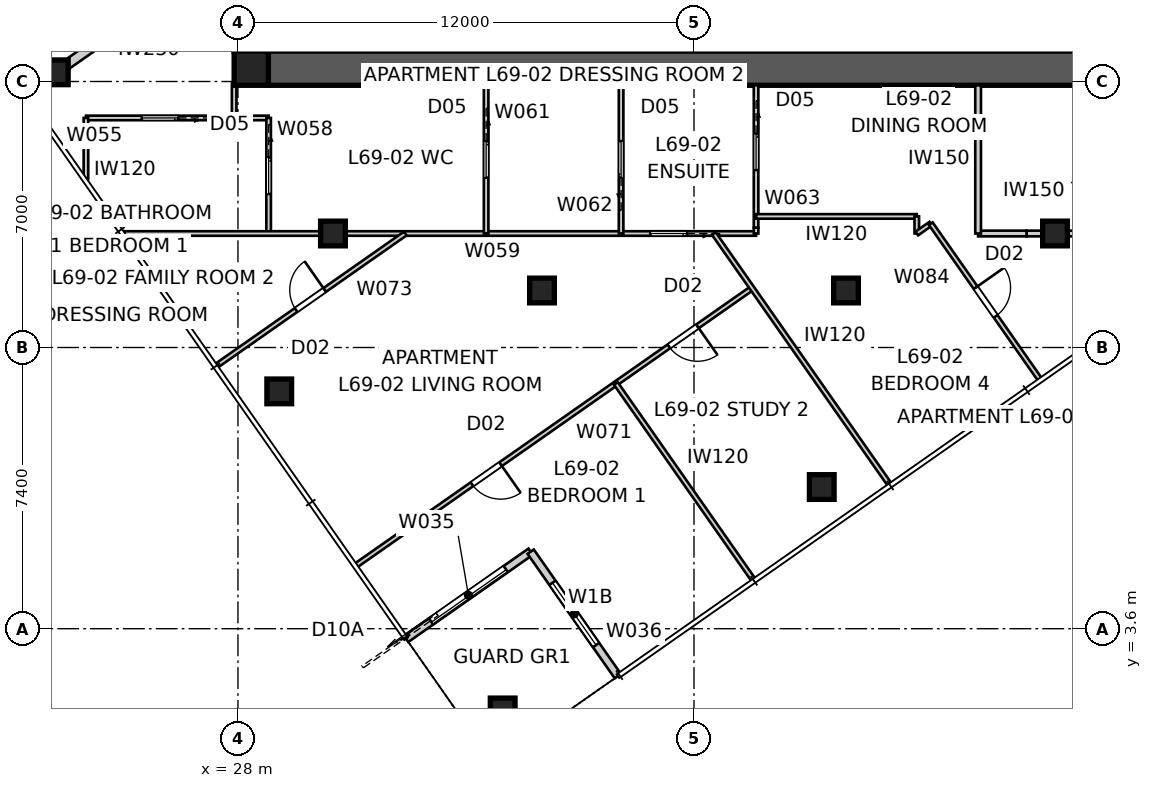
"""IFC4 building model, lengths in metres.
Left out: names, types, materials, properties, quantities, classifications, styles, units other than length and angle.
Written with IfcOpenShell. Run it as: python <this file> out.ifc"""

import sys

from ifc_helpers import new_model, si_unit, direction, frame, frame_2d, origin, origin_2d, place, context, subcontext, project, spatial, polyline, rectangle, outline, extrude, element, fill, save


model = new_model("IFC4")
c1 = context("Model", 3, precision=1e-05, world=origin(), true_north=direction((0.0, 1.0)))
c2 = subcontext(c1, "Body", "Model", "MODEL_VIEW")
j1 = project(units=[si_unit("LENGTHUNIT", "METRE"), si_unit("PLANEANGLEUNIT", "RADIAN")], contexts=[c1])
p1 = place(None, origin())
s1 = spatial("IfcSite", under=j1, at=p1, CompositionType="ELEMENT")
p2 = place(p1, origin())
s2 = spatial("IfcBuilding", under=s1, at=p2, CompositionType="ELEMENT")
p3 = place(p2, frame((0.0, 0.0, 250.6)))
s3 = spatial("IfcBuildingStorey", under=s2, at=p3, CompositionType="ELEMENT", Elevation=250.6)
p4 = place(p3, frame((51.2, 18.35, 0.0), z_axis=(0.0, 0.0, 1.0), x_axis=(-1.0, 0.0, 0.0)))
e1 = element("IfcWall", 1, at=p4, inside=s3, PredefinedType="SHEAR", context=c2, shape_type="SweptSolid", body=[
    extrude(outline(polyline([(0.0, -0.45), (22.4, -0.45), (22.4, -0.025), (22.85, -0.025), (22.85, 0.025), (22.4, 0.025), (22.4, 0.45), (0.0, 0.45), (0.0, 0.025), (-0.45, 0.025), (-0.45, -0.025), (0.0, -0.025), (0.0, -0.45)])), origin(), (0.0, 0.0, 1.0), 3.4),
])
p5 = place(p3, frame((28.35, 41.2, 0.0), z_axis=(0.0, 0.0, 1.0), x_axis=(0.0, -1.0, 0.0)))
e2 = element("IfcWall", 2, at=p5, inside=s3, PredefinedType="SHEAR", context=c2, shape_type="SweptSolid", body=[
    extrude(outline(polyline([(0.0, -0.45), (22.4, -0.45), (22.4, -0.025), (22.85, -0.025), (22.85, 0.025), (22.4, 0.025), (22.4, 0.45), (0.0, 0.45), (0.0, 0.025), (-0.45, 0.025), (-0.45, -0.025), (0.0, -0.025), (0.0, -0.45)])), origin(), (0.0, 0.0, 1.0), 3.4),
])
p6 = place(p5, frame((11.14, 0.0, 0.0)))
e3 = element("IfcOpeningElement", 3, at=p6, cuts=e2, PredefinedType="OPENING", context=c2, shape_type="SweptSolid", body=[
    extrude(rectangle(XDim=1.02, YDim=2.4, at=frame_2d((0.51, 1.2))), frame((0.0, 0.46, 0.0), z_axis=(0.0, -1.0, 0.0), x_axis=(1.0, 0.0, 0.0)), (0.0, 0.0, 1.0), 0.92),
])
p7 = place(p3, frame((28.35, 18.35, 0.0), z_axis=(0.0, 0.0, 1.0), x_axis=(1.0, 0.0, 0.0)))
e4 = element("IfcColumn", 4, at=p7, inside=s3, PredefinedType="COLUMN", context=c2, shape_type="SweptSolid", body=[
    extrude(rectangle(XDim=0.9, YDim=0.9, at=origin_2d()), origin(), (0.0, 0.0, 1.0), 3.4),
])
for number, where, z_axis, x_axis in (
    (5, (34.966, 1.449, 0.0), (0.0, 0.0, 1.0), (1.0, 0.0, 0.0)),
    (6, (43.362, 7.328, 0.0), (0.0, 0.0, 1.0), (1.0, 0.0, 0.0)),
    (7, (23.207, 18.242, 0.0), (0.0, 0.0, 1.0), (1.0, 0.0, 0.0)),
    (8, (29.086, 9.845, 0.0), (0.0, 0.0, 1.0), (1.0, 0.0, 0.0)),
    (9, (30.5, 14.0, 0.0), (0.0, 0.0, 1.0), (1.0, 0.0, 0.0)),
    (10, (36.0, 12.5, 0.0), (0.0, 0.0, 1.0), (1.0, 0.0, 0.0)),
    (11, (44.0, 12.5, 0.0), (0.0, 0.0, 1.0), (1.0, 0.0, 0.0)),
    (12, (49.5, 14.0, 0.0), (0.0, 0.0, 1.0), (1.0, 0.0, 0.0)),
):
    element("IfcColumn", number, at=place(p3, frame(where, z_axis=z_axis, x_axis=x_axis)), inside=s3, PredefinedType="COLUMN", context=c2, shape_type="SweptSolid", body=[
        extrude(rectangle(XDim=0.65, YDim=0.65, at=origin_2d()), origin(), (0.0, 0.0, 1.0), 3.4),
    ])
p8 = place(p3, frame((32.426, 3.333, 0.0), z_axis=(0.0, 0.0, 1.0), x_axis=(0.819165963305, 0.573556557423, 0.0)))
e13 = element("IfcWall", 13, at=p8, inside=s3, PredefinedType="SOLIDWALL", context=c2, shape_type="SweptSolid", body=[
    extrude(rectangle(XDim=4.0, YDim=0.2, at=frame_2d((2.0, 0.0))), origin(), (0.0, 0.0, 1.0), 3.25),
])
p9 = place(p8, frame((0.8, 0.0, 0.0)))
e14 = element("IfcOpeningElement", 14, at=p9, cuts=e13, PredefinedType="OPENING", context=c2, shape_type="SweptSolid", body=[
    extrude(rectangle(XDim=2.4, YDim=2.1, at=frame_2d((1.2, 1.05))), frame((0.0, 0.11, 0.0), z_axis=(0.0, -1.0, 0.0), x_axis=(1.0, 0.0, 0.0)), (0.0, 0.0, 1.0), 0.22),
])
p10 = place(p3, frame((35.702, 5.627, 0.0), z_axis=(0.0, 0.0, 1.0), x_axis=(0.573597512525, -0.819137286189, 0.0)))
e15 = element("IfcWall", 15, at=p10, inside=s3, PredefinedType="SOLIDWALL", context=c2, shape_type="SweptSolid", body=[
    extrude(rectangle(XDim=4.0, YDim=0.2, at=frame_2d((2.0, 0.0))), origin(), (0.0, 0.0, 1.0), 3.25),
])
p11 = place(p10, frame((1.0, 0.0, 0.45)))
e16 = element("IfcOpeningElement", 16, at=p11, cuts=e15, PredefinedType="OPENING", context=c2, shape_type="SweptSolid", body=[
    extrude(rectangle(XDim=2.0, YDim=1.8, at=frame_2d((1.0, 0.9))), frame((0.0, 0.11, 0.0), z_axis=(0.0, -1.0, 0.0), x_axis=(1.0, 0.0, 0.0)), (0.0, 0.0, 1.0), 0.22),
])
p12 = place(p3, frame((22.388, 17.668, 0.0), z_axis=(0.0, 0.0, 1.0), x_axis=(0.819161528122, 0.573562891796, 0.0)))
e17 = element("IfcWall", 17, at=p12, inside=s3, PredefinedType="PARTITIONING", context=c2, shape_type="SweptSolid", body=[
    extrude(rectangle(XDim=6.681, YDim=0.25, at=frame_2d((3.341, 0.0))), origin(), (0.0, 0.0, 1.0), 3.25),
])
p13 = place(p3, frame((28.807, 17.041, 0.0), z_axis=(0.0, 0.0, 1.0), x_axis=(-1.0, 0.0, 0.0)))
e18 = element("IfcWall", 18, at=p13, inside=s3, PredefinedType="PARTITIONING", context=c2, shape_type="SweptSolid", body=[
    extrude(rectangle(XDim=4.807, YDim=0.12, at=frame_2d((2.404, 0.0))), origin(), (0.0, 0.0, 1.0), 3.25),
])
p14 = place(p13, frame((2.377, 0.0, 0.0)))
e19 = element("IfcOpeningElement", 19, at=p14, cuts=e18, PredefinedType="OPENING", context=c2, shape_type="SweptSolid", body=[
    extrude(rectangle(XDim=0.96, YDim=2.1, at=frame_2d((0.48, 1.05))), frame((0.0, 0.07, 0.0), z_axis=(0.0, -1.0, 0.0), x_axis=(1.0, 0.0, 0.0)), (0.0, 0.0, 1.0), 0.14),
])
p15 = place(p3, frame((24.0, 17.041, 0.0), z_axis=(0.0, 0.0, 1.0), x_axis=(0.0, -1.0, 0.0)))
e20 = element("IfcWall", 20, at=p15, inside=s3, PredefinedType="PARTITIONING", context=c2, shape_type="SweptSolid", body=[
    extrude(rectangle(XDim=1.605, YDim=0.12, at=frame_2d((0.803, 0.0))), origin(), (0.0, 0.0, 1.0), 3.25),
])
p16 = place(p3, frame((27.9, 17.95, 0.0), z_axis=(0.0, 0.0, 1.0), x_axis=(0.0, -1.0, 0.0)))
e21 = element("IfcWall", 21, at=p16, inside=s3, PredefinedType="PARTITIONING", context=c2, shape_type="SweptSolid", body=[
    extrude(rectangle(XDim=0.909, YDim=0.12, at=frame_2d((0.454, 0.0))), origin(), (0.0, 0.0, 1.0), 3.25),
])
p17 = place(p3, frame((28.807, 17.041, 0.0), z_axis=(0.0, 0.0, 1.0), x_axis=(0.0, -1.0, 0.0)))
e22 = element("IfcWall", 22, at=p17, inside=s3, PredefinedType="PARTITIONING", context=c2, shape_type="SweptSolid", body=[
    extrude(rectangle(XDim=3.041, YDim=0.12, at=frame_2d((1.521, 0.0))), origin(), (0.0, 0.0, 1.0), 3.25),
])
p18 = place(p17, frame((1.041, 0.0, 0.0)))
e23 = element("IfcOpeningElement", 23, at=p18, cuts=e22, PredefinedType="OPENING", context=c2, shape_type="SweptSolid", body=[
    extrude(rectangle(XDim=0.96, YDim=2.1, at=frame_2d((0.48, 1.05))), frame((0.0, 0.07, 0.0), z_axis=(0.0, -1.0, 0.0), x_axis=(1.0, 0.0, 0.0)), (0.0, 0.0, 1.0), 0.14),
])
p19 = place(p3, frame((41.634, 14.0, 0.0), z_axis=(0.0, 0.0, 1.0), x_axis=(-1.0, 0.0, 0.0)))
e24 = element("IfcWall", 24, at=p19, inside=s3, PredefinedType="PARTITIONING", context=c2, shape_type="SweptSolid", body=[
    extrude(rectangle(XDim=16.628, YDim=0.12, at=frame_2d((8.314, 0.0))), origin(), (0.0, 0.0, 1.0), 2.55),
])
p20 = place(p19, frame((1.821, 0.0, 0.0)))
e25 = element("IfcOpeningElement", 25, at=p20, cuts=e24, PredefinedType="OPENING", context=c2, shape_type="SweptSolid", body=[
    extrude(rectangle(XDim=0.96, YDim=2.1, at=frame_2d((0.48, 1.05))), frame((0.0, 0.07, 0.0), z_axis=(0.0, -1.0, 0.0), x_axis=(1.0, 0.0, 0.0)), (0.0, 0.0, 1.0), 0.14),
])
p21 = place(p3, frame((34.53, 17.9, 0.0), z_axis=(0.0, 0.0, 1.0), x_axis=(0.0, -1.0, 0.0)))
e26 = element("IfcWall", 26, at=p21, inside=s3, PredefinedType="PARTITIONING", context=c2, shape_type="SweptSolid", body=[
    extrude(rectangle(XDim=3.9, YDim=0.12, at=frame_2d((1.95, 0.0))), origin(), (0.0, 0.0, 1.0), 3.25),
])
p22 = place(p21, frame((1.47, 0.0, 0.0)))
e27 = element("IfcOpeningElement", 27, at=p22, cuts=e26, PredefinedType="OPENING", context=c2, shape_type="SweptSolid", body=[
    extrude(rectangle(XDim=0.96, YDim=2.1, at=frame_2d((0.48, 1.05))), frame((0.0, 0.07, 0.0), z_axis=(0.0, -1.0, 0.0), x_axis=(1.0, 0.0, 0.0)), (0.0, 0.0, 1.0), 0.14),
])
p23 = place(p3, frame((38.082, 14.0, 0.0), z_axis=(0.0, 0.0, 1.0), x_axis=(0.0, 1.0, 0.0)))
e28 = element("IfcWall", 28, at=p23, inside=s3, PredefinedType="PARTITIONING", context=c2, shape_type="SweptSolid", body=[
    extrude(rectangle(XDim=3.9, YDim=0.12, at=frame_2d((1.95, 0.0))), origin(), (0.0, 0.0, 1.0), 3.25),
])
p24 = place(p23, frame((1.47, 0.0, 0.0)))
e29 = element("IfcOpeningElement", 29, at=p24, cuts=e28, PredefinedType="OPENING", context=c2, shape_type="SweptSolid", body=[
    extrude(rectangle(XDim=0.96, YDim=2.1, at=frame_2d((0.48, 1.05))), frame((0.0, 0.07, 0.0), z_axis=(0.0, -1.0, 0.0), x_axis=(1.0, 0.0, 0.0)), (0.0, 0.0, 1.0), 0.14),
])
p25 = place(p3, frame((41.634, 17.9, 0.0), z_axis=(0.0, 0.0, 1.0), x_axis=(0.0, -1.0, 0.0)))
e30 = element("IfcWall", 30, at=p25, inside=s3, PredefinedType="PARTITIONING", context=c2, shape_type="SweptSolid", body=[
    extrude(rectangle(XDim=3.746, YDim=0.12, at=frame_2d((1.873, 0.0))), origin(), (0.0, 0.0, 1.0), 3.25),
])
p26 = place(p25, frame((1.27, 0.0, 0.0)))
e31 = element("IfcOpeningElement", 31, at=p26, cuts=e30, PredefinedType="OPENING", context=c2, shape_type="SweptSolid", body=[
    extrude(rectangle(XDim=0.96, YDim=2.1, at=frame_2d((0.48, 1.05))), frame((0.0, 0.07, 0.0), z_axis=(0.0, -1.0, 0.0), x_axis=(1.0, 0.0, 0.0)), (0.0, 0.0, 1.0), 0.14),
])
p27 = place(p3, frame((51.722, 14.0, 0.0), z_axis=(0.0, 0.0, 1.0), x_axis=(-1.0, 0.0, 0.0)))
e32 = element("IfcWall", 32, at=p27, inside=s3, PredefinedType="SOLIDWALL", context=c2, shape_type="SweptSolid", body=[
    extrude(rectangle(XDim=2.202, YDim=0.15, at=frame_2d((1.101, 0.0))), origin(), (0.0, 0.0, 1.0), 3.25),
])
p28 = place(p3, frame((49.521, 14.0, 0.0), z_axis=(0.0, 0.0, 1.0), x_axis=(-1.0, 0.0, 0.0)))
e33 = element("IfcWall", 33, at=p28, inside=s3, PredefinedType="SOLIDWALL", context=c2, shape_type="SweptSolid", body=[
    extrude(rectangle(XDim=0.771, YDim=0.15, at=frame_2d((0.385, 0.0))), origin(), (0.0, 0.0, 1.0), 2.55),
])
p29 = place(p3, frame((48.75, 14.0, 0.0), z_axis=(0.0, 0.0, 1.0), x_axis=(-1.0, 0.0, 0.0)))
e34 = element("IfcWall", 34, at=p29, inside=s3, PredefinedType="SOLIDWALL", context=c2, shape_type="SweptSolid", body=[
    extrude(rectangle(XDim=1.274, YDim=0.15, at=frame_2d((0.637, 0.0))), origin(), (0.0, 0.0, 1.0), 3.25),
])
p30 = place(p3, frame((47.476, 14.0, 0.0), z_axis=(0.0, 0.0, 1.0), x_axis=(0.0, 1.0, 0.0)))
e35 = element("IfcWall", 35, at=p30, inside=s3, PredefinedType="SOLIDWALL", context=c2, shape_type="SweptSolid", body=[
    extrude(rectangle(XDim=3.9, YDim=0.15, at=frame_2d((1.95, 0.0))), origin(), (0.0, 0.0, 1.0), 3.25),
])
p31 = place(p3, frame((41.528, 12.562, 0.0), z_axis=(0.0, 0.0, 1.0), x_axis=(-0.819155207289, -0.573571919092, 0.0)))
e36 = element("IfcWall", 36, at=p31, inside=s3, PredefinedType="PARTITIONING", context=c2, shape_type="SweptSolid", body=[
    extrude(rectangle(XDim=12.71, YDim=0.12, at=frame_2d((6.355, 0.0))), origin(), (0.0, 0.0, 1.0), 3.25),
])
p32 = place(p31, frame((8.077, 0.0, 0.0)))
e37 = element("IfcOpeningElement", 37, at=p32, cuts=e36, PredefinedType="OPENING", context=c2, shape_type="SweptSolid", body=[
    extrude(rectangle(XDim=0.92, YDim=2.34, at=frame_2d((0.46, 1.17))), frame((0.0, 0.07, 0.0), z_axis=(0.0, -1.0, 0.0), x_axis=(1.0, 0.0, 0.0)), (0.0, 0.0, 1.0), 0.14),
])
p33 = place(p31, frame((1.752, 0.0, 0.0)))
e38 = element("IfcOpeningElement", 38, at=p33, cuts=e36, PredefinedType="OPENING", context=c2, shape_type="SweptSolid", body=[
    extrude(rectangle(XDim=0.92, YDim=2.34, at=frame_2d((0.46, 1.17))), frame((0.0, 0.07, 0.0), z_axis=(0.0, -1.0, 0.0), x_axis=(1.0, 0.0, 0.0)), (0.0, 0.0, 1.0), 0.14),
])
p34 = place(p3, frame((40.521, 14.0, 0.0), z_axis=(0.0, 0.0, 1.0), x_axis=(0.573574225095, -0.819153592623, 0.0)))
e39 = element("IfcWall", 39, at=p34, inside=s3, PredefinedType="PARTITIONING", context=c2, shape_type="SweptSolid", body=[
    extrude(rectangle(XDim=8.054, YDim=0.12, at=frame_2d((4.027, 0.0))), origin(), (0.0, 0.0, 1.0), 3.25),
])
p35 = place(p3, frame((27.44, 10.523, 0.0), z_axis=(0.0, 0.0, 1.0), x_axis=(0.81915432861, 0.573573173989, 0.0)))
e40 = element("IfcWall", 40, at=p35, inside=s3, PredefinedType="PARTITIONING", context=c2, shape_type="SweptSolid", body=[
    extrude(rectangle(XDim=6.061, YDim=0.12, at=frame_2d((3.031, 0.0))), origin(), (0.0, 0.0, 1.0), 3.25),
])
p36 = place(p35, frame((2.551, 0.0, 0.0)))
e41 = element("IfcOpeningElement", 41, at=p36, cuts=e40, PredefinedType="OPENING", context=c2, shape_type="SweptSolid", body=[
    extrude(rectangle(XDim=0.92, YDim=2.34, at=frame_2d((0.46, 1.17))), frame((0.0, 0.07, 0.0), z_axis=(0.0, -1.0, 0.0), x_axis=(1.0, 0.0, 0.0)), (0.0, 0.0, 1.0), 0.14),
])
p37 = place(p3, frame((37.944, 10.053, 0.0), z_axis=(0.0, 0.0, 1.0), x_axis=(0.573587188897, -0.81914451517, 0.0)))
e42 = element("IfcWall", 42, at=p37, inside=s3, PredefinedType="PARTITIONING", context=c2, shape_type="SweptSolid", body=[
    extrude(rectangle(XDim=6.3, YDim=0.12, at=frame_2d((3.15, 0.0))), origin(), (0.0, 0.0, 1.0), 3.25),
])
p38 = place(p3, frame((41.634, 14.45, 0.0), z_axis=(0.0, 0.0, 1.0), x_axis=(1.0, 0.0, 0.0)))
e43 = element("IfcWall", 43, at=p38, inside=s3, PredefinedType="PARTITIONING", context=c2, shape_type="SweptSolid", body=[
    extrude(rectangle(XDim=4.229, YDim=0.12, at=frame_2d((2.114, 0.0))), origin(), (0.0, 0.0, 1.0), 3.25),
])
for number, where, z_axis, x_axis in (
    (44, (45.862, 14.45, 0.0), (0.0, 0.0, 1.0), (0.0, -1.0, 0.0)),
    (45, (45.862, 14.0, 0.0), (0.0, 0.0, 1.0), (0.819, 0.573, 0.0)),
):
    element("IfcWall", number, at=place(p3, frame(where, z_axis=z_axis, x_axis=x_axis)), inside=s3, PredefinedType="PARTITIONING", context=c2, shape_type="SweptSolid", body=[
        extrude(rectangle(XDim=0.45, YDim=0.12, at=frame_2d((0.225, 0.0))), origin(), (0.0, 0.0, 1.0), 3.25),
    ])
p39 = place(p3, frame((46.231, 14.258, 0.0), z_axis=(0.0, 0.0, 1.0), x_axis=(0.57358708951, -0.819144584763, 0.0)))
e46 = element("IfcWall", 46, at=p39, inside=s3, PredefinedType="PARTITIONING", context=c2, shape_type="SweptSolid", body=[
    extrude(rectangle(XDim=4.991, YDim=0.12, at=frame_2d((2.496, 0.0))), origin(), (0.0, 0.0, 1.0), 3.25),
])
p40 = place(p39, frame((2.055, 0.0, 0.0)))
e47 = element("IfcOpeningElement", 47, at=p40, cuts=e46, PredefinedType="OPENING", context=c2, shape_type="SweptSolid", body=[
    extrude(rectangle(XDim=0.92, YDim=2.34, at=frame_2d((0.46, 1.17))), frame((0.0, 0.07, 0.0), z_axis=(0.0, -1.0, 0.0), x_axis=(1.0, 0.0, 0.0)), (0.0, 0.0, 1.0), 0.14),
])
p41 = place(p3, frame((41.634, 14.0, 0.0), z_axis=(0.0, 0.0, 1.0), x_axis=(0.0, 1.0, 0.0)))
e48 = element("IfcWall", 48, at=p41, inside=s3, PredefinedType="PARTITIONING", context=c2, shape_type="SweptSolid", body=[
    extrude(rectangle(XDim=0.154, YDim=0.12, at=frame_2d((0.077, 0.0))), origin(), (0.0, 0.0, 1.0), 3.25),
])
p42 = place(p9, origin())
e49 = element("IfcDoor", 49, at=p42, inside=s3, OperationType="SLIDING_TO_LEFT", PredefinedType="DOOR", context=c2, shape_type="SweptSolid", body=[
    extrude(rectangle(XDim=2.4, YDim=2.1, at=frame_2d((1.2, 1.05))), frame((0.0, 0.025, 0.0), z_axis=(0.0, -1.0, 0.0), x_axis=(1.0, 0.0, 0.0)), (0.0, 0.0, 1.0), 0.05),
])
fill(e14, e49)
p43 = place(p11, origin())
e50 = element("IfcWindow", 50, at=p43, inside=s3, PartitioningType="SINGLE_PANEL", PredefinedType="WINDOW", context=c2, shape_type="SweptSolid", body=[
    extrude(rectangle(XDim=2.0, YDim=1.8, at=frame_2d((1.0, 0.9))), frame((0.0, 0.03, 0.0), z_axis=(0.0, -1.0, 0.0), x_axis=(1.0, 0.0, 0.0)), (0.0, 0.0, 1.0), 0.06),
])
fill(e16, e50)
p44 = place(p40, origin())
e51 = element("IfcDoor", 51, at=p44, inside=s3, OperationType="SINGLE_SWING_LEFT", PredefinedType="DOOR", context=c2, shape_type="SweptSolid", body=[
    extrude(rectangle(XDim=0.92, YDim=2.34, at=frame_2d((0.46, 1.17))), frame((0.0, 0.025, 0.0), z_axis=(0.0, -1.0, 0.0), x_axis=(1.0, 0.0, 0.0)), (0.0, 0.0, 1.0), 0.05),
])
fill(e47, e51)
p45 = place(p26, origin())
e52 = element("IfcDoor", 52, at=p45, inside=s3, OperationType="SLIDING_TO_LEFT", PredefinedType="DOOR", context=c2, shape_type="SweptSolid", body=[
    extrude(rectangle(XDim=0.96, YDim=2.1, at=frame_2d((0.48, 1.05))), frame((0.0, 0.025, 0.0), z_axis=(0.0, -1.0, 0.0), x_axis=(1.0, 0.0, 0.0)), (0.0, 0.0, 1.0), 0.05),
])
fill(e31, e52)
p46 = place(p24, origin())
e53 = element("IfcDoor", 53, at=p46, inside=s3, OperationType="SLIDING_TO_LEFT", PredefinedType="DOOR", context=c2, shape_type="SweptSolid", body=[
    extrude(rectangle(XDim=0.96, YDim=2.1, at=frame_2d((0.48, 1.05))), frame((0.0, 0.025, 0.0), z_axis=(0.0, -1.0, 0.0), x_axis=(1.0, 0.0, 0.0)), (0.0, 0.0, 1.0), 0.05),
])
fill(e29, e53)
p47 = place(p20, origin())
e54 = element("IfcDoor", 54, at=p47, inside=s3, OperationType="SLIDING_TO_LEFT", PredefinedType="DOOR", context=c2, shape_type="SweptSolid", body=[
    extrude(rectangle(XDim=0.96, YDim=2.1, at=frame_2d((0.48, 1.05))), frame((0.0, 0.025, 0.0), z_axis=(0.0, -1.0, 0.0), x_axis=(1.0, 0.0, 0.0)), (0.0, 0.0, 1.0), 0.05),
])
fill(e25, e54)
p48 = place(p22, origin())
e55 = element("IfcDoor", 55, at=p48, inside=s3, OperationType="SLIDING_TO_LEFT", PredefinedType="DOOR", context=c2, shape_type="SweptSolid", body=[
    extrude(rectangle(XDim=0.96, YDim=2.1, at=frame_2d((0.48, 1.05))), frame((0.0, 0.025, 0.0), z_axis=(0.0, -1.0, 0.0), x_axis=(1.0, 0.0, 0.0)), (0.0, 0.0, 1.0), 0.05),
])
fill(e27, e55)
p49 = place(p32, origin())
e56 = element("IfcDoor", 56, at=p49, inside=s3, OperationType="SINGLE_SWING_LEFT", PredefinedType="DOOR", context=c2, shape_type="SweptSolid", body=[
    extrude(rectangle(XDim=0.92, YDim=2.34, at=frame_2d((0.46, 1.17))), frame((0.0, 0.025, 0.0), z_axis=(0.0, -1.0, 0.0), x_axis=(1.0, 0.0, 0.0)), (0.0, 0.0, 1.0), 0.05),
])
fill(e37, e56)
p50 = place(p36, origin())
e57 = element("IfcDoor", 57, at=p50, inside=s3, OperationType="SINGLE_SWING_RIGHT", PredefinedType="DOOR", context=c2, shape_type="SweptSolid", body=[
    extrude(rectangle(XDim=0.92, YDim=2.34, at=frame_2d((0.46, 1.17))), frame((0.0, 0.025, 0.0), z_axis=(0.0, -1.0, 0.0), x_axis=(1.0, 0.0, 0.0)), (0.0, 0.0, 1.0), 0.05),
])
fill(e41, e57)
p51 = place(p33, origin())
e58 = element("IfcDoor", 58, at=p51, inside=s3, OperationType="SINGLE_SWING_LEFT", PredefinedType="DOOR", context=c2, shape_type="SweptSolid", body=[
    extrude(rectangle(XDim=0.92, YDim=2.34, at=frame_2d((0.46, 1.17))), frame((0.0, 0.025, 0.0), z_axis=(0.0, -1.0, 0.0), x_axis=(1.0, 0.0, 0.0)), (0.0, 0.0, 1.0), 0.05),
])
fill(e38, e58)
p52 = place(p18, origin())
e59 = element("IfcDoor", 59, at=p52, inside=s3, OperationType="SLIDING_TO_LEFT", PredefinedType="DOOR", context=c2, shape_type="SweptSolid", body=[
    extrude(rectangle(XDim=0.96, YDim=2.1, at=frame_2d((0.48, 1.05))), frame((0.0, 0.025, 0.0), z_axis=(0.0, -1.0, 0.0), x_axis=(1.0, 0.0, 0.0)), (0.0, 0.0, 1.0), 0.05),
])
fill(e23, e59)
p53 = place(p14, origin())
e60 = element("IfcDoor", 60, at=p53, inside=s3, OperationType="SLIDING_TO_LEFT", PredefinedType="DOOR", context=c2, shape_type="SweptSolid", body=[
    extrude(rectangle(XDim=0.96, YDim=2.1, at=frame_2d((0.48, 1.05))), frame((0.0, 0.025, 0.0), z_axis=(0.0, -1.0, 0.0), x_axis=(1.0, 0.0, 0.0)), (0.0, 0.0, 1.0), 0.05),
])
fill(e19, e60)
save(model, sys.argv[1])
